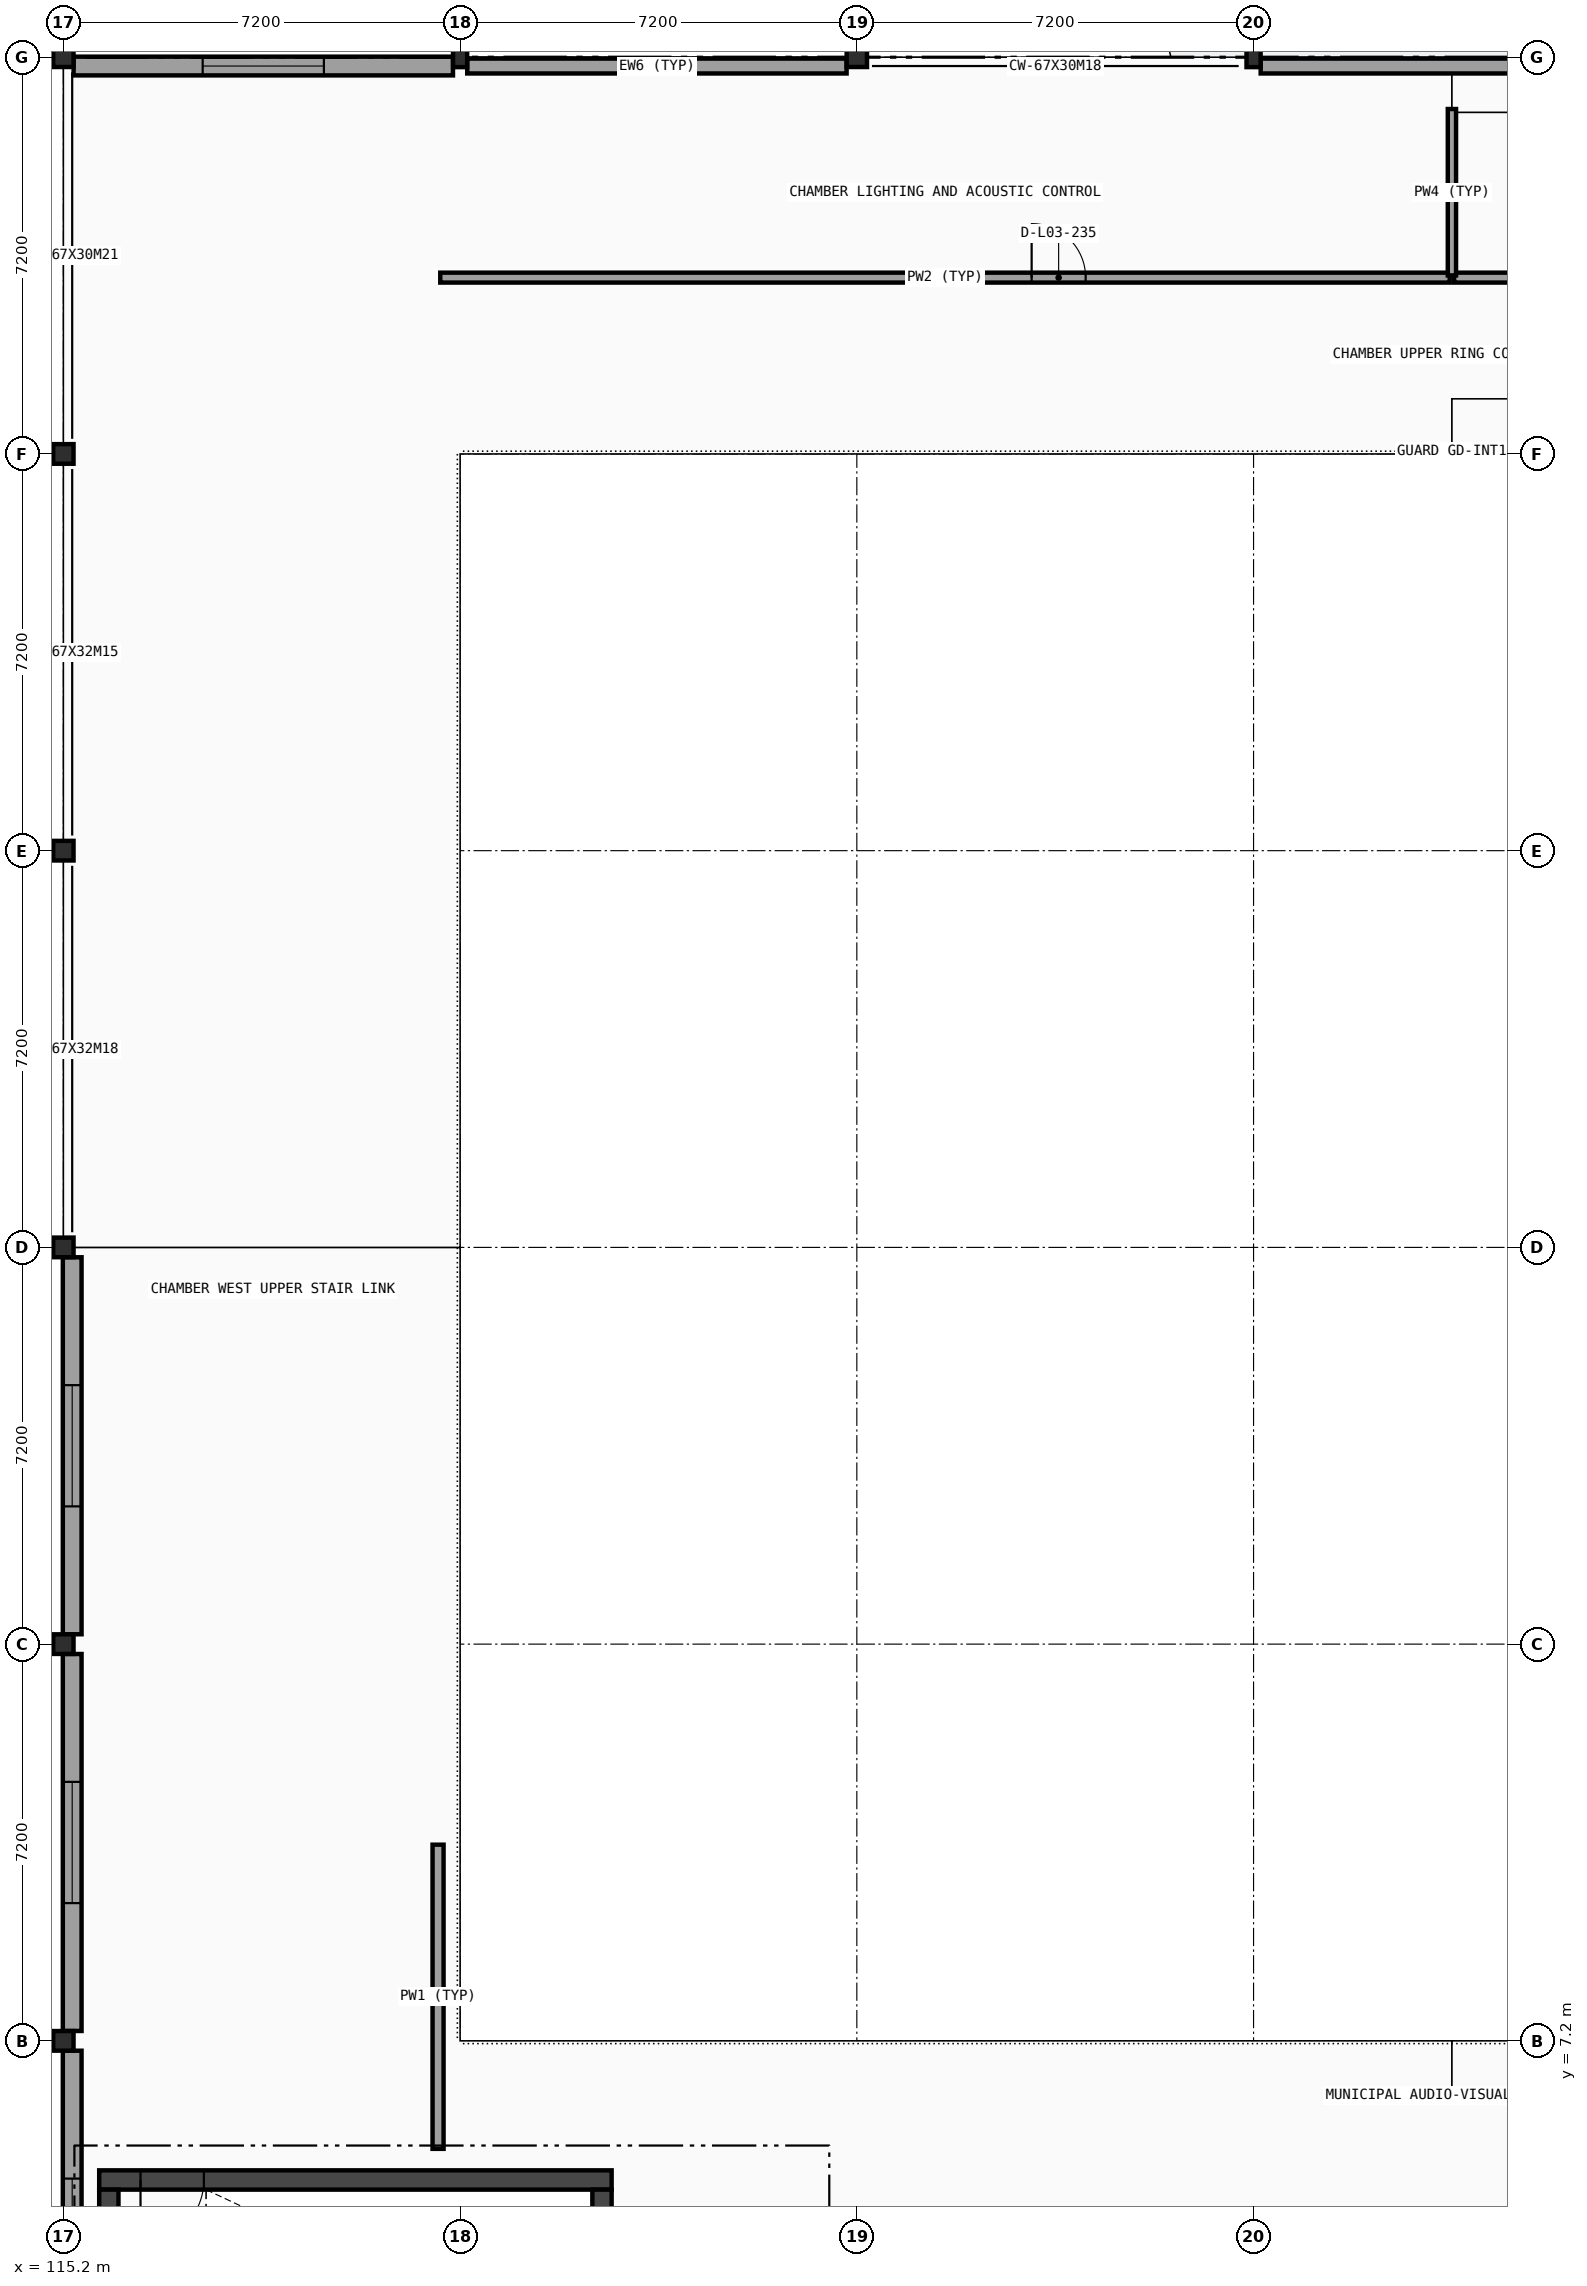
"""IFC4 building model, lengths in metres.
Left out: names, types, materials, properties, quantities, classifications, styles, units other than length and angle.
Written with IfcOpenShell. Run it as: python <this file> out.ifc"""

import sys

from ifc_helpers import new_model, si_unit, direction, frame, frame_2d, origin, origin_2d, place, context, subcontext, project, spatial, rectangle, i_section, extrude, element, fill, save


model = new_model("IFC4")
c1 = context("Model", 3, precision=1e-05, world=origin(), true_north=direction((0.0, 1.0)))
c2 = subcontext(c1, "Body", "Model", "MODEL_VIEW")
j1 = project(units=[si_unit("LENGTHUNIT", "METRE"), si_unit("PLANEANGLEUNIT", "RADIAN")], contexts=[c1])
p1 = place(None, origin())
s1 = spatial("IfcSite", under=j1, at=p1, CompositionType="ELEMENT")
p2 = place(p1, origin())
s2 = spatial("IfcBuilding", under=s1, at=p2, CompositionType="ELEMENT")
p3 = place(p2, frame((0.0, 0.0, 14.7)))
s3 = spatial("IfcBuildingStorey", under=s2, at=p3, CompositionType="ELEMENT", Elevation=14.7)
for number, where, z_axis, x_axis in (
    (1, (115.2, 7.2, 0.0), (0.0, 0.0, 1.0), (1.0, 0.0, 0.0)),
    (2, (115.2, 14.4, 0.0), (0.0, 0.0, 1.0), (1.0, 0.0, 0.0)),
    (3, (115.2, 21.6, 0.0), (0.0, 0.0, 1.0), (1.0, 0.0, 0.0)),
    (4, (115.2, 28.8, 0.0), (0.0, 0.0, 1.0), (1.0, 0.0, 0.0)),
    (5, (115.2, 36.0, 0.0), (0.0, 0.0, 1.0), (1.0, 0.0, 0.0)),
    (6, (115.2, 43.2, 0.0), (0.0, 0.0, 1.0), (1.0, 0.0, 0.0)),
):
    element("IfcColumn", number, at=place(p3, frame(where, z_axis=z_axis, x_axis=x_axis)), inside=s3, PredefinedType="COLUMN", context=c2, shape_type="SweptSolid", body=[
        extrude(i_section(OverallWidth=0.369, OverallDepth=0.356, WebThickness=0.011, FlangeThickness=0.018, FilletRadius=0.018, at=origin_2d()), origin(), (0.0, 0.0, 1.0), 4.2),
    ])
p4 = place(p3, frame((122.4, 43.2, 0.0), z_axis=(0.0, 0.0, 1.0), x_axis=(1.0, 0.0, 0.0)))
e7 = element("IfcColumn", 7, at=p4, inside=s3, PredefinedType="COLUMN", context=c2, shape_type="SweptSolid", body=[
    extrude(i_section(OverallWidth=0.256, OverallDepth=0.36, WebThickness=0.011, FlangeThickness=0.02, FilletRadius=0.015, at=origin_2d()), origin(), (0.0, 0.0, 1.0), 4.2),
])
p5 = place(p3, frame((129.6, 43.2, 0.0), z_axis=(0.0, 0.0, 1.0), x_axis=(1.0, 0.0, 0.0)))
e8 = element("IfcColumn", 8, at=p5, inside=s3, PredefinedType="COLUMN", context=c2, shape_type="SweptSolid", body=[
    extrude(i_section(OverallWidth=0.369, OverallDepth=0.356, WebThickness=0.011, FlangeThickness=0.018, FilletRadius=0.018, at=origin_2d()), origin(), (0.0, 0.0, 1.0), 4.2),
])
p6 = place(p3, frame((136.8, 43.2, 0.0), z_axis=(0.0, 0.0, 1.0), x_axis=(1.0, 0.0, 0.0)))
e9 = element("IfcColumn", 9, at=p6, inside=s3, PredefinedType="COLUMN", context=c2, shape_type="SweptSolid", body=[
    extrude(i_section(OverallWidth=0.256, OverallDepth=0.36, WebThickness=0.011, FlangeThickness=0.02, FilletRadius=0.015, at=origin_2d()), origin(), (0.0, 0.0, 1.0), 4.2),
])
p7 = place(p3, frame((115.36, 0.179, 0.0), z_axis=(0.0, 0.0, 1.0), x_axis=(0.0, 1.0, 0.0)))
e10 = element("IfcWall", 10, at=p7, inside=s3, PredefinedType="SOLIDWALL", context=c2, shape_type="SweptSolid", body=[
    extrude(rectangle(XDim=6.842, YDim=0.34, at=frame_2d((3.421, 0.0))), origin(), (0.0, 0.0, 1.0), 3.018),
])
p8 = place(p7, frame((2.321, 0.0, 1.4)))
e11 = element("IfcOpeningElement", 11, at=p8, cuts=e10, PredefinedType="OPENING", context=c2, shape_type="SweptSolid", body=[
    extrude(rectangle(XDim=2.2, YDim=1.05, at=frame_2d((1.1, 0.525))), frame((0.0, 0.18, 0.0), z_axis=(0.0, -1.0, 0.0), x_axis=(1.0, 0.0, 0.0)), (0.0, 0.0, 1.0), 0.36),
])
p9 = place(p3, frame((115.36, 7.379, 0.0), z_axis=(0.0, 0.0, 1.0), x_axis=(0.0, 1.0, 0.0)))
e12 = element("IfcWall", 12, at=p9, inside=s3, PredefinedType="SOLIDWALL", context=c2, shape_type="SweptSolid", body=[
    extrude(rectangle(XDim=6.842, YDim=0.34, at=frame_2d((3.421, 0.0))), origin(), (0.0, 0.0, 1.0), 3.235),
])
p10 = place(p9, frame((2.321, 0.0, 1.4)))
e13 = element("IfcOpeningElement", 13, at=p10, cuts=e12, PredefinedType="OPENING", context=c2, shape_type="SweptSolid", body=[
    extrude(rectangle(XDim=2.2, YDim=1.05, at=frame_2d((1.1, 0.525))), frame((0.0, 0.18, 0.0), z_axis=(0.0, -1.0, 0.0), x_axis=(1.0, 0.0, 0.0)), (0.0, 0.0, 1.0), 0.36),
])
p11 = place(p3, frame((115.36, 14.579, 0.0), z_axis=(0.0, 0.0, 1.0), x_axis=(0.0, 1.0, 0.0)))
e14 = element("IfcWall", 14, at=p11, inside=s3, PredefinedType="SOLIDWALL", context=c2, shape_type="SweptSolid", body=[
    extrude(rectangle(XDim=6.842, YDim=0.34, at=frame_2d((3.421, 0.0))), origin(), (0.0, 0.0, 1.0), 3.235),
])
p12 = place(p11, frame((2.321, 0.0, 1.4)))
e15 = element("IfcOpeningElement", 15, at=p12, cuts=e14, PredefinedType="OPENING", context=c2, shape_type="SweptSolid", body=[
    extrude(rectangle(XDim=2.2, YDim=1.05, at=frame_2d((1.1, 0.525))), frame((0.0, 0.18, 0.0), z_axis=(0.0, -1.0, 0.0), x_axis=(1.0, 0.0, 0.0)), (0.0, 0.0, 1.0), 0.36),
])
p13 = place(p3, frame((115.385, 43.04, 0.0), z_axis=(0.0, 0.0, 1.0), x_axis=(1.0, 0.0, 0.0)))
e16 = element("IfcWall", 16, at=p13, inside=s3, PredefinedType="SOLIDWALL", context=c2, shape_type="SweptSolid", body=[
    extrude(rectangle(XDim=6.885, YDim=0.34, at=frame_2d((3.443, 0.0))), origin(), (0.0, 0.0, 1.0), 3.018),
])
p14 = place(p13, frame((2.343, 0.0, 1.4)))
e17 = element("IfcOpeningElement", 17, at=p14, cuts=e16, PredefinedType="OPENING", context=c2, shape_type="SweptSolid", body=[
    extrude(rectangle(XDim=2.2, YDim=1.05, at=frame_2d((1.1, 0.525))), frame((0.0, 0.18, 0.0), z_axis=(0.0, -1.0, 0.0), x_axis=(1.0, 0.0, 0.0)), (0.0, 0.0, 1.0), 0.36),
])
for number, where, z_axis, x_axis in (
    (18, (122.529, 43.04, 0.0), (0.0, 0.0, 1.0), (1.0, 0.0, 0.0)),
    (19, (136.929, 43.04, 0.0), (0.0, 0.0, 1.0), (1.0, 0.0, 0.0)),
):
    element("IfcWall", number, at=place(p3, frame(where, z_axis=z_axis, x_axis=x_axis)), inside=s3, PredefinedType="SOLIDWALL", context=c2, shape_type="SweptSolid", body=[
        extrude(rectangle(XDim=6.885, YDim=0.27, at=frame_2d((3.443, 0.0))), origin(), (0.0, 0.0, 1.0), 3.022),
    ])
p15 = place(p3, frame((125.15, 4.675, 0.0), z_axis=(0.0, 0.0, 1.0), x_axis=(-1.0, 0.0, 0.0)))
e20 = element("IfcWall", 20, at=p15, inside=s3, PredefinedType="SHEAR", context=c2, shape_type="SweptSolid", body=[
    extrude(rectangle(XDim=9.3, YDim=0.35, at=frame_2d((4.65, 0.0))), origin(), (0.0, 0.0, 1.0), 3.95),
])
p16 = place(p15, frame((7.4, 0.0, 0.0)))
e21 = element("IfcOpeningElement", 21, at=p16, cuts=e20, PredefinedType="OPENING", context=c2, shape_type="SweptSolid", body=[
    extrude(rectangle(XDim=1.15, YDim=2.1, at=frame_2d((0.575, 1.05))), frame((0.0, 0.185, 0.0), z_axis=(0.0, -1.0, 0.0), x_axis=(1.0, 0.0, 0.0)), (0.0, 0.0, 1.0), 0.37),
])
for number, where, z_axis, x_axis in (
    (22, (116.025, 4.5, 0.0), (0.0, 0.0, 1.0), (0.0, -1.0, 0.0)),
    (23, (124.975, 1.2, 0.0), (0.0, 0.0, 1.0), (0.0, 1.0, 0.0)),
):
    element("IfcWall", number, at=place(p3, frame(where, z_axis=z_axis, x_axis=x_axis)), inside=s3, PredefinedType="SHEAR", context=c2, shape_type="SweptSolid", body=[
        extrude(rectangle(XDim=3.3, YDim=0.35, at=frame_2d((1.65, 0.0))), origin(), (0.0, 0.0, 1.0), 3.95),
    ])
p17 = place(p3, frame((122.04, 39.2, 0.0), z_axis=(0.0, 0.0, 1.0), x_axis=(1.0, 0.0, 0.0)))
e24 = element("IfcWall", 24, at=p17, inside=s3, PredefinedType="PARTITIONING", context=c2, shape_type="SweptSolid", body=[
    extrude(rectangle(XDim=18.32, YDim=0.18, at=frame_2d((9.16, 0.0))), origin(), (0.0, 0.0, 1.0), 3.022),
])
p18 = place(p17, frame((10.732, 0.0, 0.0)))
e25 = element("IfcOpeningElement", 25, at=p18, cuts=e24, PredefinedType="OPENING", context=c2, shape_type="SweptSolid", body=[
    extrude(rectangle(XDim=0.98, YDim=2.1, at=frame_2d((0.49, 1.05))), frame((0.0, 0.1, 0.0), z_axis=(0.0, -1.0, 0.0), x_axis=(1.0, 0.0, 0.0)), (0.0, 0.0, 1.0), 0.2),
])
p19 = place(p3, frame((140.44, 39.2, 0.0), z_axis=(0.0, 0.0, 1.0), x_axis=(1.0, 0.0, 0.0)))
e26 = element("IfcWall", 26, at=p19, inside=s3, PredefinedType="PARTITIONING", context=c2, shape_type="SweptSolid", body=[
    extrude(rectangle(XDim=18.32, YDim=0.18, at=frame_2d((9.16, 0.0))), origin(), (0.0, 0.0, 1.0), 3.022),
])
p20 = place(p19, frame((6.607, 0.0, 0.0)))
e27 = element("IfcOpeningElement", 27, at=p20, cuts=e26, PredefinedType="OPENING", context=c2, shape_type="SweptSolid", body=[
    extrude(rectangle(XDim=0.98, YDim=2.1, at=frame_2d((0.49, 1.05))), frame((0.0, 0.1, 0.0), z_axis=(0.0, -1.0, 0.0), x_axis=(1.0, 0.0, 0.0)), (0.0, 0.0, 1.0), 0.2),
])
p21 = place(p3, frame((122.0, 5.24, 0.0), z_axis=(0.0, 0.0, 1.0), x_axis=(0.0, 1.0, 0.0)))
e28 = element("IfcWall", 28, at=p21, inside=s3, PredefinedType="PARTITIONING", context=c2, shape_type="SweptSolid", body=[
    extrude(rectangle(XDim=5.52, YDim=0.2, at=frame_2d((2.76, 0.0))), origin(), (0.0, 0.0, 1.0), 3.95),
])
p22 = place(p3, frame((140.4, 39.24, 0.0), z_axis=(0.0, 0.0, 1.0), x_axis=(0.0, 1.0, 0.0)))
e29 = element("IfcWall", 29, at=p22, inside=s3, PredefinedType="PARTITIONING", context=c2, shape_type="SweptSolid", body=[
    extrude(rectangle(XDim=3.02, YDim=0.15, at=frame_2d((1.51, 0.0))), origin(), (0.0, 0.0, 1.0), 3.95),
])
p23 = place(p8, origin())
e30 = element("IfcWindow", 30, at=p23, inside=s3, PartitioningType="SINGLE_PANEL", PredefinedType="WINDOW", context=c2, shape_type="SweptSolid", body=[
    extrude(rectangle(XDim=2.2, YDim=1.05, at=frame_2d((1.1, 0.525))), frame((0.0, 0.03, 0.0), z_axis=(0.0, -1.0, 0.0), x_axis=(1.0, 0.0, 0.0)), (0.0, 0.0, 1.0), 0.06),
])
fill(e11, e30)
p24 = place(p10, origin())
e31 = element("IfcWindow", 31, at=p24, inside=s3, PartitioningType="SINGLE_PANEL", PredefinedType="WINDOW", context=c2, shape_type="SweptSolid", body=[
    extrude(rectangle(XDim=2.2, YDim=1.05, at=frame_2d((1.1, 0.525))), frame((0.0, 0.03, 0.0), z_axis=(0.0, -1.0, 0.0), x_axis=(1.0, 0.0, 0.0)), (0.0, 0.0, 1.0), 0.06),
])
fill(e13, e31)
p25 = place(p12, origin())
e32 = element("IfcWindow", 32, at=p25, inside=s3, PartitioningType="SINGLE_PANEL", PredefinedType="WINDOW", context=c2, shape_type="SweptSolid", body=[
    extrude(rectangle(XDim=2.2, YDim=1.05, at=frame_2d((1.1, 0.525))), frame((0.0, 0.03, 0.0), z_axis=(0.0, -1.0, 0.0), x_axis=(1.0, 0.0, 0.0)), (0.0, 0.0, 1.0), 0.06),
])
fill(e15, e32)
p26 = place(p14, origin())
e33 = element("IfcWindow", 33, at=p26, inside=s3, PartitioningType="SINGLE_PANEL", PredefinedType="WINDOW", context=c2, shape_type="SweptSolid", body=[
    extrude(rectangle(XDim=2.2, YDim=1.05, at=frame_2d((1.1, 0.525))), frame((0.0, 0.03, 0.0), z_axis=(0.0, -1.0, 0.0), x_axis=(1.0, 0.0, 0.0)), (0.0, 0.0, 1.0), 0.06),
])
fill(e17, e33)
p27 = place(p16, frame((1.15, 0.0, 0.0), z_axis=(0.0, 0.0, 1.0), x_axis=(-1.0, 0.0, 0.0)))
e34 = element("IfcDoor", 34, at=p27, inside=s3, OperationType="SINGLE_SWING_LEFT", PredefinedType="DOOR", context=c2, shape_type="SweptSolid", body=[
    extrude(rectangle(XDim=1.15, YDim=2.1, at=frame_2d((0.575, 1.05))), frame((0.0, 0.025, 0.0), z_axis=(0.0, -1.0, 0.0), x_axis=(1.0, 0.0, 0.0)), (0.0, 0.0, 1.0), 0.05),
])
fill(e21, e34)
p28 = place(p18, origin())
e35 = element("IfcDoor", 35, at=p28, inside=s3, OperationType="SINGLE_SWING_LEFT", PredefinedType="DOOR", context=c2, shape_type="SweptSolid", body=[
    extrude(rectangle(XDim=0.98, YDim=2.1, at=frame_2d((0.49, 1.05))), frame((0.0, 0.025, 0.0), z_axis=(0.0, -1.0, 0.0), x_axis=(1.0, 0.0, 0.0)), (0.0, 0.0, 1.0), 0.05),
])
fill(e25, e35)
save(model, sys.argv[1])
